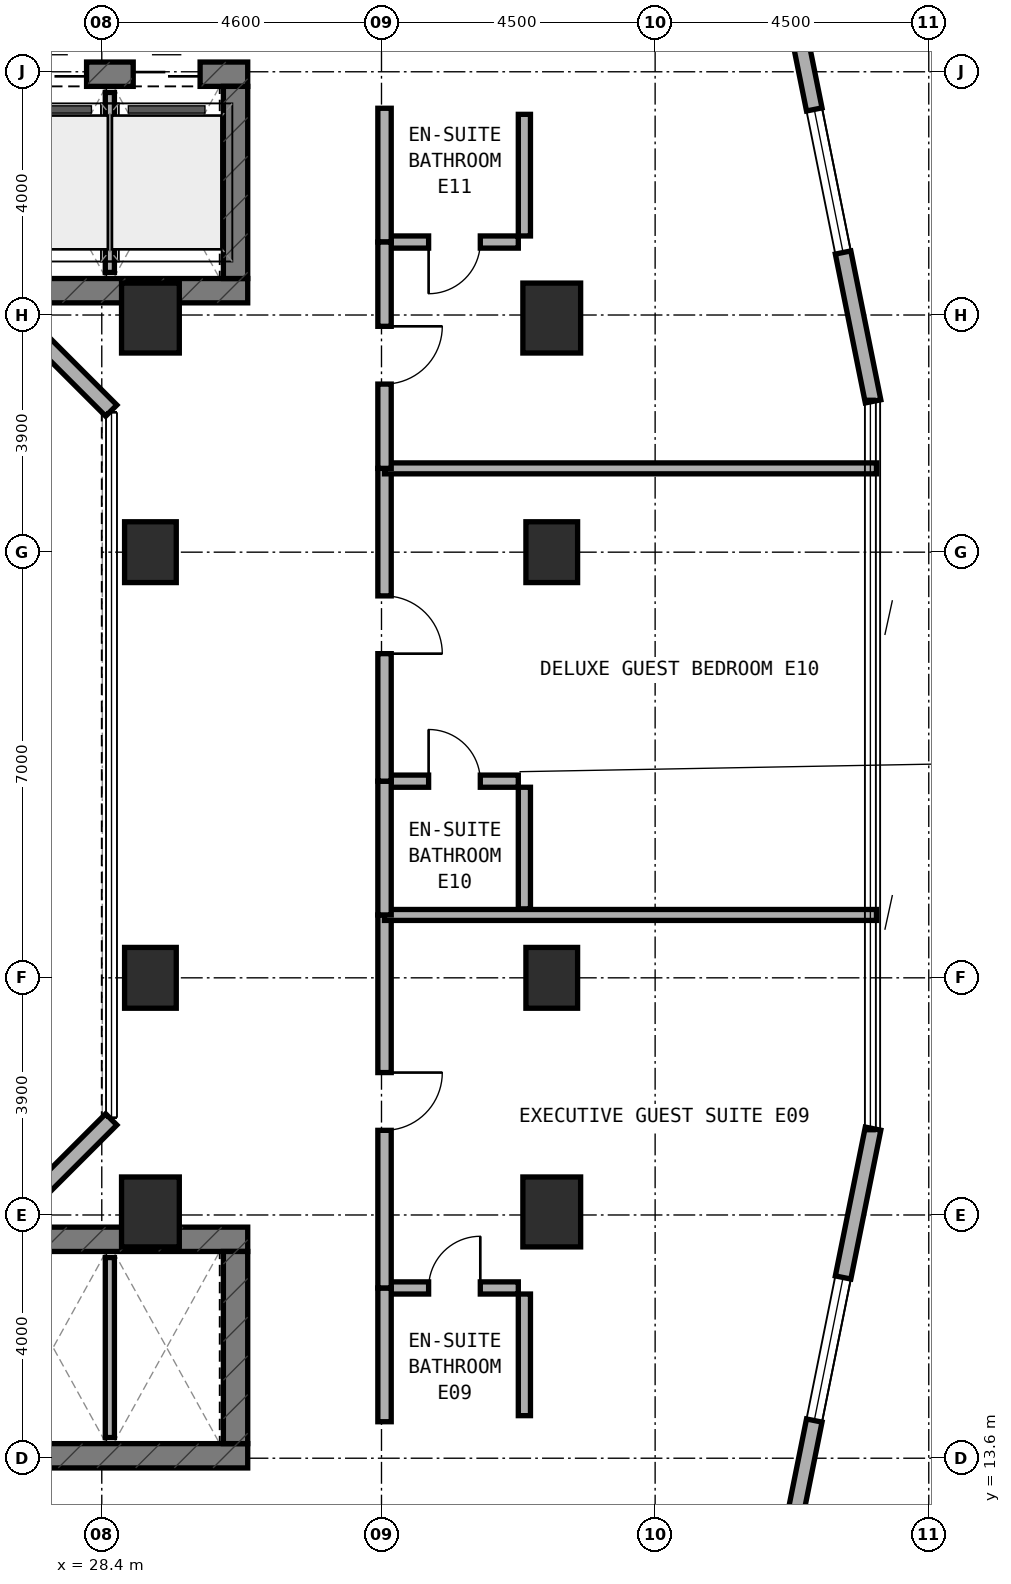
"""IFC4 building model, lengths in metres.
Left out: names, types, materials, properties, quantities, classifications, styles, units other than length and angle.
Written with IfcOpenShell. Run it as: python <this file> out.ifc"""

import sys

from ifc_helpers import new_model, si_unit, direction, frame, frame_2d, origin, origin_2d, place, context, subcontext, project, spatial, rectangle, extrude, element, fill, save


model = new_model("IFC4")
c1 = context("Model", 3, precision=1e-05, world=origin(), true_north=direction((0.0, 1.0)))
c2 = subcontext(c1, "Body", "Model", "MODEL_VIEW")
j1 = project(units=[si_unit("LENGTHUNIT", "METRE"), si_unit("PLANEANGLEUNIT", "RADIAN")], contexts=[c1])
p1 = place(None, origin())
s1 = spatial("IfcSite", under=j1, at=p1, CompositionType="ELEMENT")
p2 = place(p1, origin())
s2 = spatial("IfcBuilding", under=s1, at=p2, CompositionType="ELEMENT")
p3 = place(p2, frame((0.0, 0.0, 116.0)))
s3 = spatial("IfcBuildingStorey", under=s2, at=p3, CompositionType="ELEMENT", Elevation=116.0)
p4 = place(p3, frame((6.4, 32.8, 0.0), z_axis=(0.0, 0.0, 1.0), x_axis=(1.0, 0.0, 0.0)))
e1 = element("IfcWall", 1, at=p4, inside=s3, PredefinedType="SHEAR", context=c2, shape_type="SweptSolid", body=[
    extrude(rectangle(XDim=24.4, YDim=0.4, at=frame_2d((12.2, 0.0))), origin(), (0.0, 0.0, 1.0), 3.5),
])
p5 = place(p4, frame((6.05, 0.0, 0.0)))
e2 = element("IfcOpeningElement", 2, at=p5, cuts=e1, PredefinedType="OPENING", context=c2, shape_type="SweptSolid", body=[
    extrude(rectangle(XDim=1.1, YDim=2.15, at=frame_2d((0.55, 1.075))), frame((0.0, 0.21, 0.0), z_axis=(0.0, -1.0, 0.0), x_axis=(1.0, 0.0, 0.0)), (0.0, 0.0, 1.0), 0.42),
])
p6 = place(p3, frame((6.4, 36.36, 0.0), z_axis=(0.0, 0.0, 1.0), x_axis=(1.0, 0.0, 0.0)))
e3 = element("IfcWall", 3, at=p6, inside=s3, PredefinedType="SHEAR", context=c2, shape_type="SweptSolid", body=[
    extrude(rectangle(XDim=24.4, YDim=0.4, at=frame_2d((12.2, 0.0))), origin(), (0.0, 0.0, 1.0), 3.5),
])
p7 = place(p6, frame((9.15, 0.0, 0.0)))
e4 = element("IfcOpeningElement", 4, at=p7, cuts=e3, PredefinedType="OPENING", context=c2, shape_type="SweptSolid", body=[
    extrude(rectangle(XDim=1.2, YDim=2.15, at=frame_2d((0.6, 1.075))), frame((0.0, 0.21, 0.0), z_axis=(0.0, -1.0, 0.0), x_axis=(1.0, 0.0, 0.0)), (0.0, 0.0, 1.0), 0.42),
])
p8 = place(p6, frame((16.94, 0.0, 0.0)))
e5 = element("IfcOpeningElement", 5, at=p8, cuts=e3, PredefinedType="OPENING", context=c2, shape_type="SweptSolid", body=[
    extrude(rectangle(XDim=0.85, YDim=2.1, at=frame_2d((0.425, 1.05))), frame((0.0, 0.21, 0.0), z_axis=(0.0, -1.0, 0.0), x_axis=(1.0, 0.0, 0.0)), (0.0, 0.0, 1.0), 0.42),
])
p9 = place(p6, frame((18.783, 0.0, 0.0)))
e6 = element("IfcOpeningElement", 6, at=p9, cuts=e3, PredefinedType="OPENING", context=c2, shape_type="SweptSolid", body=[
    extrude(rectangle(XDim=1.1, YDim=2.15, at=frame_2d((0.55, 1.075))), frame((0.0, 0.21, 0.0), z_axis=(0.0, -1.0, 0.0), x_axis=(1.0, 0.0, 0.0)), (0.0, 0.0, 1.0), 0.42),
])
p10 = place(p6, frame((20.65, 0.0, 0.0)))
e7 = element("IfcOpeningElement", 7, at=p10, cuts=e3, PredefinedType="OPENING", context=c2, shape_type="SweptSolid", body=[
    extrude(rectangle(XDim=1.1, YDim=2.15, at=frame_2d((0.55, 1.075))), frame((0.0, 0.21, 0.0), z_axis=(0.0, -1.0, 0.0), x_axis=(1.0, 0.0, 0.0)), (0.0, 0.0, 1.0), 0.42),
])
p11 = place(p6, frame((22.517, 0.0, 0.0)))
e8 = element("IfcOpeningElement", 8, at=p11, cuts=e3, PredefinedType="OPENING", context=c2, shape_type="SweptSolid", body=[
    extrude(rectangle(XDim=1.1, YDim=2.15, at=frame_2d((0.55, 1.075))), frame((0.0, 0.21, 0.0), z_axis=(0.0, -1.0, 0.0), x_axis=(1.0, 0.0, 0.0)), (0.0, 0.0, 1.0), 0.42),
])
p12 = place(p3, frame((30.6, 33.0, 0.0), z_axis=(0.0, 0.0, 1.0), x_axis=(0.0, 1.0, 0.0)))
e9 = element("IfcWall", 9, at=p12, inside=s3, PredefinedType="SHEAR", context=c2, shape_type="SweptSolid", body=[
    extrude(rectangle(XDim=3.16, YDim=0.4, at=frame_2d((1.58, 0.0))), origin(), (0.0, 0.0, 1.0), 3.5),
])
p13 = place(p3, frame((6.4, 13.64, 0.0), z_axis=(0.0, 0.0, 1.0), x_axis=(1.0, 0.0, 0.0)))
e10 = element("IfcWall", 10, at=p13, inside=s3, PredefinedType="SHEAR", context=c2, shape_type="SweptSolid", body=[
    extrude(rectangle(XDim=24.4, YDim=0.4, at=frame_2d((12.2, 0.0))), origin(), (0.0, 0.0, 1.0), 3.5),
])
p14 = place(p13, frame((9.15, 0.0, 0.0)))
e11 = element("IfcOpeningElement", 11, at=p14, cuts=e10, PredefinedType="OPENING", context=c2, shape_type="SweptSolid", body=[
    extrude(rectangle(XDim=1.2, YDim=2.15, at=frame_2d((0.6, 1.075))), frame((0.0, 0.21, 0.0), z_axis=(0.0, -1.0, 0.0), x_axis=(1.0, 0.0, 0.0)), (0.0, 0.0, 1.0), 0.42),
])
p15 = place(p13, frame((16.94, 0.0, 0.0)))
e12 = element("IfcOpeningElement", 12, at=p15, cuts=e10, PredefinedType="OPENING", context=c2, shape_type="SweptSolid", body=[
    extrude(rectangle(XDim=0.85, YDim=2.1, at=frame_2d((0.425, 1.05))), frame((0.0, 0.21, 0.0), z_axis=(0.0, -1.0, 0.0), x_axis=(1.0, 0.0, 0.0)), (0.0, 0.0, 1.0), 0.42),
])
p16 = place(p3, frame((6.4, 17.2, 0.0), z_axis=(0.0, 0.0, 1.0), x_axis=(1.0, 0.0, 0.0)))
e13 = element("IfcWall", 13, at=p16, inside=s3, PredefinedType="SHEAR", context=c2, shape_type="SweptSolid", body=[
    extrude(rectangle(XDim=24.4, YDim=0.4, at=frame_2d((12.2, 0.0))), origin(), (0.0, 0.0, 1.0), 3.5),
])
p17 = place(p3, frame((30.6, 13.84, 0.0), z_axis=(0.0, 0.0, 1.0), x_axis=(0.0, 1.0, 0.0)))
e14 = element("IfcWall", 14, at=p17, inside=s3, PredefinedType="SHEAR", context=c2, shape_type="SweptSolid", body=[
    extrude(rectangle(XDim=3.16, YDim=0.4, at=frame_2d((1.58, 0.0))), origin(), (0.0, 0.0, 1.0), 3.5),
])
for number, where, z_axis, x_axis in (
    (15, (35.8, 21.5, 0.0), (0.0, 0.0, 1.0), (1.0, 0.0, 0.0)),
    (16, (35.8, 28.5, 0.0), (0.0, 0.0, 1.0), (1.0, 0.0, 0.0)),
):
    element("IfcColumn", number, at=place(p3, frame(where, z_axis=z_axis, x_axis=x_axis)), inside=s3, PredefinedType="COLUMN", context=c2, shape_type="SweptSolid", body=[
        extrude(rectangle(XDim=0.85, YDim=1.0, at=origin_2d()), origin(), (0.0, 0.0, 1.0), 3.5),
    ])
for number, where, z_axis, x_axis in (
    (17, (35.8, 17.65, 0.0), (0.0, 0.0, 1.0), (1.0, 0.0, 0.0)),
    (18, (35.8, 32.35, 0.0), (0.0, 0.0, 1.0), (1.0, 0.0, 0.0)),
    (19, (29.2, 17.65, 0.0), (0.0, 0.0, 1.0), (1.0, 0.0, 0.0)),
    (20, (29.2, 32.35, 0.0), (0.0, 0.0, 1.0), (1.0, 0.0, 0.0)),
):
    element("IfcColumn", number, at=place(p3, frame(where, z_axis=z_axis, x_axis=x_axis)), inside=s3, PredefinedType="COLUMN", context=c2, shape_type="SweptSolid", body=[
        extrude(rectangle(XDim=0.95, YDim=1.15, at=origin_2d()), origin(), (0.0, 0.0, 1.0), 3.5),
    ])
for number, where, z_axis, x_axis in (
    (21, (29.2, 21.5, 0.0), (0.0, 0.0, 1.0), (1.0, 0.0, 0.0)),
    (22, (29.2, 28.5, 0.0), (0.0, 0.0, 1.0), (1.0, 0.0, 0.0)),
):
    element("IfcColumn", number, at=place(p3, frame(where, z_axis=z_axis, x_axis=x_axis)), inside=s3, PredefinedType="COLUMN", context=c2, shape_type="SweptSolid", body=[
        extrude(rectangle(XDim=0.85, YDim=1.0, at=origin_2d()), origin(), (0.0, 0.0, 1.0), 3.5),
    ])
p18 = place(p3, frame((39.271, 10.018, 0.0), z_axis=(0.0, 0.0, 1.0), x_axis=(0.197435082048, 0.980315963543, 0.0)))
e23 = element("IfcWall", 23, at=p18, inside=s3, PredefinedType="STANDARD", context=c2, shape_type="SweptSolid", body=[
    extrude(rectangle(XDim=9.183, YDim=0.26, at=frame_2d((4.591, 0.0))), origin(), (0.0, 0.0, 1.0), 3.18),
])
p19 = place(p18, frame((4.286, 0.0, 0.8)))
e24 = element("IfcOpeningElement", 24, at=p19, cuts=e23, PredefinedType="OPENING", context=c2, shape_type="SweptSolid", body=[
    extrude(rectangle(XDim=2.4, YDim=1.6, at=frame_2d((1.2, 0.8))), frame((0.0, 0.14, 0.0), z_axis=(0.0, -1.0, 0.0), x_axis=(1.0, 0.0, 0.0)), (0.0, 0.0, 1.0), 0.28),
])
p20 = place(p3, frame((41.084, 30.98, 0.0), z_axis=(0.0, 0.0, 1.0), x_axis=(-0.197435082048, 0.980315963543, 0.0)))
e25 = element("IfcWall", 25, at=p20, inside=s3, PredefinedType="STANDARD", context=c2, shape_type="SweptSolid", body=[
    extrude(rectangle(XDim=9.183, YDim=0.26, at=frame_2d((4.591, 0.0))), origin(), (0.0, 0.0, 1.0), 3.18),
])
p21 = place(p20, frame((2.497, 0.0, 0.8)))
e26 = element("IfcOpeningElement", 26, at=p21, cuts=e25, PredefinedType="OPENING", context=c2, shape_type="SweptSolid", body=[
    extrude(rectangle(XDim=2.4, YDim=1.6, at=frame_2d((1.2, 0.8))), frame((0.0, 0.14, 0.0), z_axis=(0.0, -1.0, 0.0), x_axis=(1.0, 0.0, 0.0)), (0.0, 0.0, 1.0), 0.28),
])
for number, where, z_axis, x_axis in (
    (27, (26.722, 17.338, 0.0), (0.0, 0.0, 1.0), (0.707, 0.707, 0.0)),
    (28, (28.556, 30.828, 0.0), (0.0, 0.0, 1.0), (-0.707, 0.707, 0.0)),
):
    element("IfcWall", number, at=place(p3, frame(where, z_axis=z_axis, x_axis=x_axis)), inside=s3, PredefinedType="STANDARD", context=c2, shape_type="SweptSolid", body=[
        extrude(rectangle(XDim=2.594, YDim=0.26, at=frame_2d((1.297, 0.0))), origin(), (0.0, 0.0, 1.0), 3.18),
    ])
for number, where, z_axis, x_axis in (
    (29, (28.533, 33.1, 0.0), (0.0, 0.0, 1.0), (0.0, 1.0, 0.0)),
    (30, (28.533, 13.94, 0.0), (0.0, 0.0, 1.0), (0.0, 1.0, 0.0)),
):
    element("IfcWall", number, at=place(p3, frame(where, z_axis=z_axis, x_axis=x_axis)), inside=s3, PredefinedType="PARTITIONING", context=c2, shape_type="SweptSolid", body=[
        extrude(rectangle(XDim=2.96, YDim=0.15, at=frame_2d((1.48, 0.0))), origin(), (0.0, 0.0, 1.0), 2.655),
    ])
p22 = place(p3, frame((33.15, 16.4, 0.0), z_axis=(0.0, 0.0, 1.0), x_axis=(1.0, 0.0, 0.0)))
e31 = element("IfcWall", 31, at=p22, inside=s3, PredefinedType="PLUMBINGWALL", context=c2, shape_type="SweptSolid", body=[
    extrude(rectangle(XDim=2.1, YDim=0.2, at=frame_2d((1.05, 0.0))), origin(), (0.0, 0.0, 1.0), 3.18),
])
p23 = place(p22, frame((0.625, 0.0, 0.0)))
e32 = element("IfcOpeningElement", 32, at=p23, cuts=e31, PredefinedType="OPENING", context=c2, shape_type="SweptSolid", body=[
    extrude(rectangle(XDim=0.85, YDim=2.1, at=frame_2d((0.425, 1.05))), frame((0.0, 0.11, 0.0), z_axis=(0.0, -1.0, 0.0), x_axis=(1.0, 0.0, 0.0)), (0.0, 0.0, 1.0), 0.22),
])
p24 = place(p3, frame((35.35, 14.3, 0.0), z_axis=(0.0, 0.0, 1.0), x_axis=(0.0, 1.0, 0.0)))
e33 = element("IfcWall", 33, at=p24, inside=s3, PredefinedType="PLUMBINGWALL", context=c2, shape_type="SweptSolid", body=[
    extrude(rectangle(XDim=2.0, YDim=0.2, at=frame_2d((1.0, 0.0))), origin(), (0.0, 0.0, 1.0), 2.795),
])
p25 = place(p3, frame((33.05, 14.2, 0.0), z_axis=(0.0, 0.0, 1.0), x_axis=(0.0, 1.0, 0.0)))
e34 = element("IfcWall", 34, at=p25, inside=s3, PredefinedType="SOLIDWALL", context=c2, shape_type="SweptSolid", body=[
    extrude(rectangle(XDim=2.2, YDim=0.22, at=frame_2d((1.1, 0.0))), origin(), (0.0, 0.0, 1.0), 3.18),
])
p26 = place(p3, frame((33.05, 16.4, 0.0), z_axis=(0.0, 0.0, 1.0), x_axis=(0.0, 1.0, 0.0)))
e35 = element("IfcWall", 35, at=p26, inside=s3, PredefinedType="SOLIDWALL", context=c2, shape_type="SweptSolid", body=[
    extrude(rectangle(XDim=6.134, YDim=0.22, at=frame_2d((3.067, 0.0))), origin(), (0.0, 0.0, 1.0), 2.655),
])
p27 = place(p26, frame((2.592, 0.0, 0.0)))
e36 = element("IfcOpeningElement", 36, at=p27, cuts=e35, PredefinedType="OPENING", context=c2, shape_type="SweptSolid", body=[
    extrude(rectangle(XDim=0.95, YDim=2.1, at=frame_2d((0.475, 1.05))), frame((0.0, 0.12, 0.0), z_axis=(0.0, -1.0, 0.0), x_axis=(1.0, 0.0, 0.0)), (0.0, 0.0, 1.0), 0.24),
])
p28 = place(p3, frame((33.05, 22.534, 0.0), z_axis=(0.0, 0.0, 1.0), x_axis=(1.0, 0.0, 0.0)))
e37 = element("IfcWall", 37, at=p28, inside=s3, PredefinedType="SOLIDWALL", context=c2, shape_type="SweptSolid", body=[
    extrude(rectangle(XDim=8.09, YDim=0.18, at=frame_2d((4.045, 0.0))), origin(), (0.0, 0.0, 1.0), 2.795),
])
p29 = place(p3, frame((33.15, 24.734, 0.0), z_axis=(0.0, 0.0, 1.0), x_axis=(1.0, 0.0, 0.0)))
e38 = element("IfcWall", 38, at=p29, inside=s3, PredefinedType="PLUMBINGWALL", context=c2, shape_type="SweptSolid", body=[
    extrude(rectangle(XDim=2.1, YDim=0.2, at=frame_2d((1.05, 0.0))), origin(), (0.0, 0.0, 1.0), 3.18),
])
p30 = place(p29, frame((0.625, 0.0, 0.0)))
e39 = element("IfcOpeningElement", 39, at=p30, cuts=e38, PredefinedType="OPENING", context=c2, shape_type="SweptSolid", body=[
    extrude(rectangle(XDim=0.85, YDim=2.1, at=frame_2d((0.425, 1.05))), frame((0.0, 0.11, 0.0), z_axis=(0.0, -1.0, 0.0), x_axis=(1.0, 0.0, 0.0)), (0.0, 0.0, 1.0), 0.22),
])
p31 = place(p3, frame((35.35, 22.634, 0.0), z_axis=(0.0, 0.0, 1.0), x_axis=(0.0, 1.0, 0.0)))
e40 = element("IfcWall", 40, at=p31, inside=s3, PredefinedType="PLUMBINGWALL", context=c2, shape_type="SweptSolid", body=[
    extrude(rectangle(XDim=2.0, YDim=0.2, at=frame_2d((1.0, 0.0))), origin(), (0.0, 0.0, 1.0), 3.18),
])
p32 = place(p3, frame((33.05, 22.534, 0.0), z_axis=(0.0, 0.0, 1.0), x_axis=(0.0, 1.0, 0.0)))
e41 = element("IfcWall", 41, at=p32, inside=s3, PredefinedType="SOLIDWALL", context=c2, shape_type="SweptSolid", body=[
    extrude(rectangle(XDim=2.2, YDim=0.22, at=frame_2d((1.1, 0.0))), origin(), (0.0, 0.0, 1.0), 3.18),
])
p33 = place(p3, frame((33.05, 24.734, 0.0), z_axis=(0.0, 0.0, 1.0), x_axis=(0.0, 1.0, 0.0)))
e42 = element("IfcWall", 42, at=p33, inside=s3, PredefinedType="SOLIDWALL", context=c2, shape_type="SweptSolid", body=[
    extrude(rectangle(XDim=5.144, YDim=0.22, at=frame_2d((2.572, 0.0))), origin(), (0.0, 0.0, 1.0), 2.655),
])
p34 = place(p33, frame((2.097, 0.0, 0.0)))
e43 = element("IfcOpeningElement", 43, at=p34, cuts=e42, PredefinedType="OPENING", context=c2, shape_type="SweptSolid", body=[
    extrude(rectangle(XDim=0.95, YDim=2.1, at=frame_2d((0.475, 1.05))), frame((0.0, 0.12, 0.0), z_axis=(0.0, -1.0, 0.0), x_axis=(1.0, 0.0, 0.0)), (0.0, 0.0, 1.0), 0.24),
])
p35 = place(p3, frame((33.05, 29.878, 0.0), z_axis=(0.0, 0.0, 1.0), x_axis=(1.0, 0.0, 0.0)))
e44 = element("IfcWall", 44, at=p35, inside=s3, PredefinedType="SOLIDWALL", context=c2, shape_type="SweptSolid", body=[
    extrude(rectangle(XDim=8.09, YDim=0.18, at=frame_2d((4.045, 0.0))), origin(), (0.0, 0.0, 1.0), 2.795),
])
p36 = place(p3, frame((33.15, 33.6, 0.0), z_axis=(0.0, 0.0, 1.0), x_axis=(1.0, 0.0, 0.0)))
e45 = element("IfcWall", 45, at=p36, inside=s3, PredefinedType="PLUMBINGWALL", context=c2, shape_type="SweptSolid", body=[
    extrude(rectangle(XDim=2.1, YDim=0.2, at=frame_2d((1.05, 0.0))), origin(), (0.0, 0.0, 1.0), 3.18),
])
p37 = place(p36, frame((0.625, 0.0, 0.0)))
e46 = element("IfcOpeningElement", 46, at=p37, cuts=e45, PredefinedType="OPENING", context=c2, shape_type="SweptSolid", body=[
    extrude(rectangle(XDim=0.85, YDim=2.1, at=frame_2d((0.425, 1.05))), frame((0.0, 0.11, 0.0), z_axis=(0.0, -1.0, 0.0), x_axis=(1.0, 0.0, 0.0)), (0.0, 0.0, 1.0), 0.22),
])
p38 = place(p3, frame((35.35, 33.7, 0.0), z_axis=(0.0, 0.0, 1.0), x_axis=(0.0, 1.0, 0.0)))
e47 = element("IfcWall", 47, at=p38, inside=s3, PredefinedType="PLUMBINGWALL", context=c2, shape_type="SweptSolid", body=[
    extrude(rectangle(XDim=2.0, YDim=0.2, at=frame_2d((1.0, 0.0))), origin(), (0.0, 0.0, 1.0), 2.795),
])
p39 = place(p3, frame((33.05, 33.6, 0.0), z_axis=(0.0, 0.0, 1.0), x_axis=(0.0, 1.0, 0.0)))
e48 = element("IfcWall", 48, at=p39, inside=s3, PredefinedType="SOLIDWALL", context=c2, shape_type="SweptSolid", body=[
    extrude(rectangle(XDim=2.2, YDim=0.22, at=frame_2d((1.1, 0.0))), origin(), (0.0, 0.0, 1.0), 3.18),
])
p40 = place(p3, frame((33.05, 29.878, 0.0), z_axis=(0.0, 0.0, 1.0), x_axis=(0.0, 1.0, 0.0)))
e49 = element("IfcWall", 49, at=p40, inside=s3, PredefinedType="SOLIDWALL", context=c2, shape_type="SweptSolid", body=[
    extrude(rectangle(XDim=3.722, YDim=0.22, at=frame_2d((1.861, 0.0))), origin(), (0.0, 0.0, 1.0), 2.655),
])
p41 = place(p40, frame((1.386, 0.0, 0.0)))
e50 = element("IfcOpeningElement", 50, at=p41, cuts=e49, PredefinedType="OPENING", context=c2, shape_type="SweptSolid", body=[
    extrude(rectangle(XDim=0.95, YDim=2.1, at=frame_2d((0.475, 1.05))), frame((0.0, 0.12, 0.0), z_axis=(0.0, -1.0, 0.0), x_axis=(1.0, 0.0, 0.0)), (0.0, 0.0, 1.0), 0.24),
])
p42 = place(p19, origin())
e51 = element("IfcWindow", 51, at=p42, inside=s3, PartitioningType="SINGLE_PANEL", PredefinedType="WINDOW", context=c2, shape_type="SweptSolid", body=[
    extrude(rectangle(XDim=2.4, YDim=1.6, at=frame_2d((1.2, 0.8))), frame((0.0, 0.03, 0.0), z_axis=(0.0, -1.0, 0.0), x_axis=(1.0, 0.0, 0.0)), (0.0, 0.0, 1.0), 0.06),
])
fill(e24, e51)
p43 = place(p21, origin())
e52 = element("IfcWindow", 52, at=p43, inside=s3, PartitioningType="SINGLE_PANEL", PredefinedType="WINDOW", context=c2, shape_type="SweptSolid", body=[
    extrude(rectangle(XDim=2.4, YDim=1.6, at=frame_2d((1.2, 0.8))), frame((0.0, 0.03, 0.0), z_axis=(0.0, -1.0, 0.0), x_axis=(1.0, 0.0, 0.0)), (0.0, 0.0, 1.0), 0.06),
])
fill(e26, e52)
p44 = place(p10, origin())
e53 = element("IfcDoor", 53, at=p44, inside=s3, OperationType="DOUBLE_DOOR_SLIDING", PredefinedType="DOOR", context=c2, shape_type="SweptSolid", body=[
    extrude(rectangle(XDim=1.1, YDim=2.15, at=frame_2d((0.55, 1.075))), frame((0.0, 0.025, 0.0), z_axis=(0.0, -1.0, 0.0), x_axis=(1.0, 0.0, 0.0)), (0.0, 0.0, 1.0), 0.05),
])
fill(e7, e53)
p45 = place(p11, origin())
e54 = element("IfcDoor", 54, at=p45, inside=s3, OperationType="DOUBLE_DOOR_SLIDING", PredefinedType="DOOR", context=c2, shape_type="SweptSolid", body=[
    extrude(rectangle(XDim=1.1, YDim=2.15, at=frame_2d((0.55, 1.075))), frame((0.0, 0.025, 0.0), z_axis=(0.0, -1.0, 0.0), x_axis=(1.0, 0.0, 0.0)), (0.0, 0.0, 1.0), 0.05),
])
fill(e8, e54)
p46 = place(p23, origin())
e55 = element("IfcDoor", 55, at=p46, inside=s3, OperationType="SINGLE_SWING_RIGHT", PredefinedType="DOOR", context=c2, shape_type="SweptSolid", body=[
    extrude(rectangle(XDim=0.85, YDim=2.1, at=frame_2d((0.425, 1.05))), frame((0.0, 0.025, 0.0), z_axis=(0.0, -1.0, 0.0), x_axis=(1.0, 0.0, 0.0)), (0.0, 0.0, 1.0), 0.05),
])
fill(e32, e55)
p47 = place(p27, frame((0.95, 0.0, 0.0), z_axis=(0.0, 0.0, 1.0), x_axis=(-1.0, 0.0, 0.0)))
e56 = element("IfcDoor", 56, at=p47, inside=s3, OperationType="SINGLE_SWING_LEFT", PredefinedType="DOOR", context=c2, shape_type="SweptSolid", body=[
    extrude(rectangle(XDim=0.95, YDim=2.1, at=frame_2d((0.475, 1.05))), frame((0.0, 0.025, 0.0), z_axis=(0.0, -1.0, 0.0), x_axis=(1.0, 0.0, 0.0)), (0.0, 0.0, 1.0), 0.05),
])
fill(e36, e56)
p48 = place(p30, origin())
e57 = element("IfcDoor", 57, at=p48, inside=s3, OperationType="SINGLE_SWING_LEFT", PredefinedType="DOOR", context=c2, shape_type="SweptSolid", body=[
    extrude(rectangle(XDim=0.85, YDim=2.1, at=frame_2d((0.425, 1.05))), frame((0.0, 0.025, 0.0), z_axis=(0.0, -1.0, 0.0), x_axis=(1.0, 0.0, 0.0)), (0.0, 0.0, 1.0), 0.05),
])
fill(e39, e57)
p49 = place(p34, frame((0.95, 0.0, 0.0), z_axis=(0.0, 0.0, 1.0), x_axis=(-1.0, 0.0, 0.0)))
e58 = element("IfcDoor", 58, at=p49, inside=s3, OperationType="SINGLE_SWING_RIGHT", PredefinedType="DOOR", context=c2, shape_type="SweptSolid", body=[
    extrude(rectangle(XDim=0.95, YDim=2.1, at=frame_2d((0.475, 1.05))), frame((0.0, 0.025, 0.0), z_axis=(0.0, -1.0, 0.0), x_axis=(1.0, 0.0, 0.0)), (0.0, 0.0, 1.0), 0.05),
])
fill(e43, e58)
p50 = place(p37, frame((0.85, 0.0, 0.0), z_axis=(0.0, 0.0, 1.0), x_axis=(-1.0, 0.0, 0.0)))
e59 = element("IfcDoor", 59, at=p50, inside=s3, OperationType="SINGLE_SWING_RIGHT", PredefinedType="DOOR", context=c2, shape_type="SweptSolid", body=[
    extrude(rectangle(XDim=0.85, YDim=2.1, at=frame_2d((0.425, 1.05))), frame((0.0, 0.025, 0.0), z_axis=(0.0, -1.0, 0.0), x_axis=(1.0, 0.0, 0.0)), (0.0, 0.0, 1.0), 0.05),
])
fill(e46, e59)
p51 = place(p41, frame((0.95, 0.0, 0.0), z_axis=(0.0, 0.0, 1.0), x_axis=(-1.0, 0.0, 0.0)))
e60 = element("IfcDoor", 60, at=p51, inside=s3, OperationType="SINGLE_SWING_LEFT", PredefinedType="DOOR", context=c2, shape_type="SweptSolid", body=[
    extrude(rectangle(XDim=0.95, YDim=2.1, at=frame_2d((0.475, 1.05))), frame((0.0, 0.025, 0.0), z_axis=(0.0, -1.0, 0.0), x_axis=(1.0, 0.0, 0.0)), (0.0, 0.0, 1.0), 0.05),
])
fill(e50, e60)
save(model, sys.argv[1])
